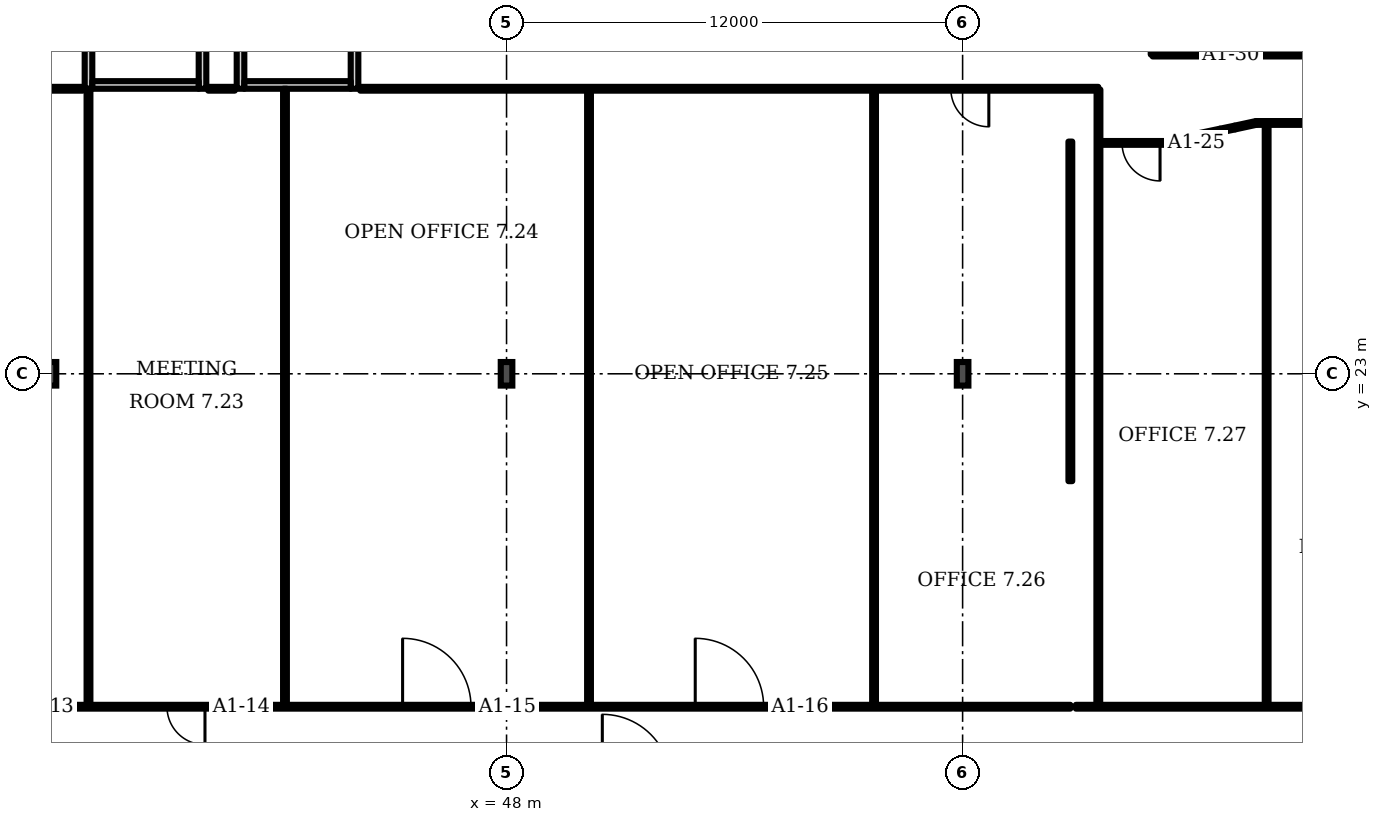
"""IFC4 building model, lengths in metres.
Left out: names, types, materials, properties, quantities, classifications, styles, units other than length and angle.
Written with IfcOpenShell. Run it as: python <this file> out.ifc"""

import sys

from ifc_helpers import new_model, si_unit, direction, frame, frame_2d, origin, origin_2d, place, context, subcontext, project, spatial, rectangle, i_section, extrude, element, fill, save


model = new_model("IFC4")
c1 = context("Model", 3, precision=1e-05, world=origin(), true_north=direction((0.0, 1.0)))
c2 = subcontext(c1, "Body", "Model", "MODEL_VIEW")
j1 = project(units=[si_unit("LENGTHUNIT", "METRE"), si_unit("PLANEANGLEUNIT", "RADIAN")], contexts=[c1])
p1 = place(None, origin())
s1 = spatial("IfcSite", under=j1, at=p1, CompositionType="ELEMENT")
p2 = place(p1, origin())
s2 = spatial("IfcBuilding", under=s1, at=p2, CompositionType="ELEMENT")
p3 = place(p2, frame((0.0, 0.0, 45.1)))
s3 = spatial("IfcBuildingStorey", under=s2, at=p3, CompositionType="ELEMENT", Elevation=45.1)
for number, where, z_axis, x_axis in (
    (1, (36.0, 23.0, 0.0), (0.0, 0.0, 1.0), (1.0, 0.0, 0.0)),
    (2, (48.0, 23.0, 0.0), (0.0, 0.0, 1.0), (1.0, 0.0, 0.0)),
    (3, (60.0, 23.0, 0.0), (0.0, 0.0, 1.0), (1.0, 0.0, 0.0)),
):
    element("IfcColumn", number, at=place(p3, frame(where, z_axis=z_axis, x_axis=x_axis)), inside=s3, PredefinedType="COLUMN", context=c2, shape_type="SweptSolid", body=[
        extrude(i_section(OverallWidth=0.305, OverallDepth=0.62, WebThickness=0.021, FlangeThickness=0.04, FilletRadius=0.027, at=origin_2d()), origin(), (0.0, 0.0, 1.0), 3.6),
    ])
p4 = place(p3, frame((37.0, 30.5, 0.0), z_axis=(0.0, 0.0, 1.0), x_axis=(0.0, 1.0, 0.0)))
e4 = element("IfcWall", 4, at=p4, inside=s3, PredefinedType="PARTITIONING", context=c2, shape_type="SweptSolid", body=[
    extrude(rectangle(XDim=3.5, YDim=0.2, at=frame_2d((1.75, 0.0))), origin(), (0.0, 0.0, 1.0), 3.2),
])
p5 = place(p4, frame((1.2, 0.0, 0.0)))
e5 = element("IfcOpeningElement", 5, at=p5, cuts=e4, PredefinedType="OPENING", context=c2, shape_type="SweptSolid", body=[
    extrude(rectangle(XDim=1.1, YDim=2.1, at=frame_2d((0.55, 1.05))), frame((0.0, 0.11, 0.0), z_axis=(0.0, -1.0, 0.0), x_axis=(1.0, 0.0, 0.0)), (0.0, 0.0, 1.0), 0.22),
])
p6 = place(p3, frame((40.0, 30.5, 0.0), z_axis=(0.0, 0.0, 1.0), x_axis=(0.0, 1.0, 0.0)))
e6 = element("IfcWall", 6, at=p6, inside=s3, PredefinedType="PARTITIONING", context=c2, shape_type="SweptSolid", body=[
    extrude(rectangle(XDim=3.5, YDim=0.2, at=frame_2d((1.75, 0.0))), origin(), (0.0, 0.0, 1.0), 3.2),
])
p7 = place(p3, frame((37.1, 30.6, 0.0), z_axis=(0.0, 0.0, 1.0), x_axis=(1.0, 0.0, 0.0)))
e7 = element("IfcWall", 7, at=p7, inside=s3, PredefinedType="PARTITIONING", context=c2, shape_type="SweptSolid", body=[
    extrude(rectangle(XDim=2.8, YDim=0.2, at=frame_2d((1.4, 0.0))), origin(), (0.0, 0.0, 1.0), 3.2),
])
p8 = place(p3, frame((41.0, 30.5, 0.0), z_axis=(0.0, 0.0, 1.0), x_axis=(0.0, 1.0, 0.0)))
e8 = element("IfcWall", 8, at=p8, inside=s3, PredefinedType="PARTITIONING", context=c2, shape_type="SweptSolid", body=[
    extrude(rectangle(XDim=3.5, YDim=0.2, at=frame_2d((1.75, 0.0))), origin(), (0.0, 0.0, 1.0), 3.2),
])
p9 = place(p3, frame((44.0, 30.5, 0.0), z_axis=(0.0, 0.0, 1.0), x_axis=(0.0, 1.0, 0.0)))
e9 = element("IfcWall", 9, at=p9, inside=s3, PredefinedType="PARTITIONING", context=c2, shape_type="SweptSolid", body=[
    extrude(rectangle(XDim=3.5, YDim=0.2, at=frame_2d((1.75, 0.0))), origin(), (0.0, 0.0, 1.0), 3.2),
])
p10 = place(p9, frame((1.2, 0.0, 0.0)))
e10 = element("IfcOpeningElement", 10, at=p10, cuts=e9, PredefinedType="OPENING", context=c2, shape_type="SweptSolid", body=[
    extrude(rectangle(XDim=1.1, YDim=2.1, at=frame_2d((0.55, 1.05))), frame((0.0, 0.11, 0.0), z_axis=(0.0, -1.0, 0.0), x_axis=(1.0, 0.0, 0.0)), (0.0, 0.0, 1.0), 0.22),
])
p11 = place(p3, frame((41.1, 30.6, 0.0), z_axis=(0.0, 0.0, 1.0), x_axis=(1.0, 0.0, 0.0)))
e11 = element("IfcWall", 11, at=p11, inside=s3, PredefinedType="PARTITIONING", context=c2, shape_type="SweptSolid", body=[
    extrude(rectangle(XDim=2.8, YDim=0.2, at=frame_2d((1.4, 0.0))), origin(), (0.0, 0.0, 1.0), 3.2),
])
p12 = place(p3, frame((10.8, 30.5, 0.0), z_axis=(0.0, 0.0, 1.0), x_axis=(1.0, 0.0, 0.0)))
e12 = element("IfcWall", 12, at=p12, inside=s3, PredefinedType="PARTITIONING", context=c2, shape_type="SweptSolid", body=[
    extrude(rectangle(XDim=26.05, YDim=0.1, at=frame_2d((13.025, 0.0))), origin(), (0.0, 0.0, 1.0), 3.2),
])
p13 = place(p12, frame((0.235, 0.0, 0.0)))
e13 = element("IfcOpeningElement", 13, at=p13, cuts=e12, PredefinedType="OPENING", context=c2, shape_type="SweptSolid", body=[
    extrude(rectangle(XDim=1.0, YDim=2.1, at=frame_2d((0.5, 1.05))), frame((0.0, 0.06, 0.0), z_axis=(0.0, -1.0, 0.0), x_axis=(1.0, 0.0, 0.0)), (0.0, 0.0, 1.0), 0.12),
])
p14 = place(p12, frame((10.955, 0.0, 0.0)))
e14 = element("IfcOpeningElement", 14, at=p14, cuts=e12, PredefinedType="OPENING", context=c2, shape_type="SweptSolid", body=[
    extrude(rectangle(XDim=1.0, YDim=2.1, at=frame_2d((0.5, 1.05))), frame((0.0, 0.06, 0.0), z_axis=(0.0, -1.0, 0.0), x_axis=(1.0, 0.0, 0.0)), (0.0, 0.0, 1.0), 0.12),
])
p15 = place(p3, frame((11.2, 14.24, 0.0), z_axis=(0.0, 0.0, 1.0), x_axis=(1.0, 0.0, 0.0)))
e15 = element("IfcWall", 15, at=p15, inside=s3, PredefinedType="PARTITIONING", context=c2, shape_type="SweptSolid", body=[
    extrude(rectangle(XDim=51.635, YDim=0.1, at=frame_2d((25.817, 0.0))), origin(), (0.0, 0.0, 1.0), 3.2),
])
p16 = place(p15, frame((0.115, 0.0, 0.0)))
e16 = element("IfcOpeningElement", 16, at=p16, cuts=e15, PredefinedType="OPENING", context=c2, shape_type="SweptSolid", body=[
    extrude(rectangle(XDim=1.0, YDim=2.1, at=frame_2d((0.5, 1.05))), frame((0.0, 0.06, 0.0), z_axis=(0.0, -1.0, 0.0), x_axis=(1.0, 0.0, 0.0)), (0.0, 0.0, 1.0), 0.12),
])
p17 = place(p15, frame((6.635, 0.0, 0.0)))
e17 = element("IfcOpeningElement", 17, at=p17, cuts=e15, PredefinedType="OPENING", context=c2, shape_type="SweptSolid", body=[
    extrude(rectangle(XDim=1.0, YDim=2.1, at=frame_2d((0.5, 1.05))), frame((0.0, 0.06, 0.0), z_axis=(0.0, -1.0, 0.0), x_axis=(1.0, 0.0, 0.0)), (0.0, 0.0, 1.0), 0.12),
])
p18 = place(p15, frame((22.7, 0.0, 0.0)))
e18 = element("IfcOpeningElement", 18, at=p18, cuts=e15, PredefinedType="OPENING", context=c2, shape_type="SweptSolid", body=[
    extrude(rectangle(XDim=1.0, YDim=2.1, at=frame_2d((0.5, 1.05))), frame((0.0, 0.06, 0.0), z_axis=(0.0, -1.0, 0.0), x_axis=(1.0, 0.0, 0.0)), (0.0, 0.0, 1.0), 0.12),
])
p19 = place(p15, frame((27.865, 0.0, 0.0)))
e19 = element("IfcOpeningElement", 19, at=p19, cuts=e15, PredefinedType="OPENING", context=c2, shape_type="SweptSolid", body=[
    extrude(rectangle(XDim=1.0, YDim=2.1, at=frame_2d((0.5, 1.05))), frame((0.0, 0.06, 0.0), z_axis=(0.0, -1.0, 0.0), x_axis=(1.0, 0.0, 0.0)), (0.0, 0.0, 1.0), 0.12),
])
p20 = place(p15, frame((34.065, 0.0, 0.0)))
e20 = element("IfcOpeningElement", 20, at=p20, cuts=e15, PredefinedType="OPENING", context=c2, shape_type="SweptSolid", body=[
    extrude(rectangle(XDim=1.8, YDim=2.1, at=frame_2d((0.9, 1.05))), frame((0.0, 0.06, 0.0), z_axis=(0.0, -1.0, 0.0), x_axis=(1.0, 0.0, 0.0)), (0.0, 0.0, 1.0), 0.12),
])
p21 = place(p15, frame((41.765, 0.0, 0.0)))
e21 = element("IfcOpeningElement", 21, at=p21, cuts=e15, PredefinedType="OPENING", context=c2, shape_type="SweptSolid", body=[
    extrude(rectangle(XDim=1.8, YDim=2.1, at=frame_2d((0.9, 1.05))), frame((0.0, 0.06, 0.0), z_axis=(0.0, -1.0, 0.0), x_axis=(1.0, 0.0, 0.0)), (0.0, 0.0, 1.0), 0.12),
])
for number, where, z_axis, x_axis in (
    (22, (37.0, 14.24, 0.0), (0.0, 0.0, 1.0), (0.0, 1.0, 0.0)),
    (23, (42.17, 14.24, 0.0), (0.0, 0.0, 1.0), (0.0, 1.0, 0.0)),
    (24, (50.17, 14.24, 0.0), (0.0, 0.0, 1.0), (0.0, 1.0, 0.0)),
    (25, (57.67, 14.24, 0.0), (0.0, 0.0, 1.0), (0.0, 1.0, 0.0)),
):
    element("IfcWall", number, at=place(p3, frame(where, z_axis=z_axis, x_axis=x_axis)), inside=s3, PredefinedType="PARTITIONING", context=c2, shape_type="SweptSolid", body=[
        extrude(rectangle(XDim=16.26, YDim=0.1, at=frame_2d((8.13, 0.0))), origin(), (0.0, 0.0, 1.0), 3.2),
    ])
p22 = place(p3, frame((62.835, 20.175, 0.0), z_axis=(0.0, 0.0, 1.0), x_axis=(0.0, 1.0, 0.0)))
e26 = element("IfcWall", 26, at=p22, inside=s3, PredefinedType="PARTITIONING", context=c2, shape_type="SweptSolid", body=[
    extrude(rectangle(XDim=8.935, YDim=0.1, at=frame_2d((4.468, 0.0))), origin(), (0.0, 0.0, 1.0), 3.2),
])
p23 = place(p3, frame((62.98, 14.24, 0.0), z_axis=(0.0, 0.0, 1.0), x_axis=(1.0, 0.0, 0.0)))
e27 = element("IfcWall", 27, at=p23, inside=s3, PredefinedType="PARTITIONING", context=c2, shape_type="SweptSolid", body=[
    extrude(rectangle(XDim=23.01, YDim=0.1, at=frame_2d((11.505, 0.0))), origin(), (0.0, 0.0, 1.0), 3.2),
])
p24 = place(p23, frame((8.6, 0.0, 0.0)))
e28 = element("IfcOpeningElement", 28, at=p24, cuts=e27, PredefinedType="OPENING", context=c2, shape_type="SweptSolid", body=[
    extrude(rectangle(XDim=1.0, YDim=2.1, at=frame_2d((0.5, 1.05))), frame((0.0, 0.06, 0.0), z_axis=(0.0, -1.0, 0.0), x_axis=(1.0, 0.0, 0.0)), (0.0, 0.0, 1.0), 0.12),
])
p25 = place(p23, frame((17.595, 0.0, 0.0)))
e29 = element("IfcOpeningElement", 29, at=p25, cuts=e27, PredefinedType="OPENING", context=c2, shape_type="SweptSolid", body=[
    extrude(rectangle(XDim=1.0, YDim=2.1, at=frame_2d((0.5, 1.05))), frame((0.0, 0.06, 0.0), z_axis=(0.0, -1.0, 0.0), x_axis=(1.0, 0.0, 0.0)), (0.0, 0.0, 1.0), 0.12),
])
p26 = place(p3, frame((63.57, 14.245, 0.0), z_axis=(0.0, 0.0, 1.0), x_axis=(0.000331, 1.000002, 0.0)))
e30 = element("IfcWall", 30, at=p26, inside=s3, PredefinedType="PARTITIONING", context=c2, shape_type="SweptSolid", body=[
    extrude(rectangle(XDim=16.233, YDim=0.1, at=frame_2d((8.117, 0.0))), origin(), (0.0, 0.0, 1.0), 3.2),
])
p27 = place(p3, frame((63.575, 29.075, 0.0), z_axis=(0.0, 0.0, 1.0), x_axis=(1.0, 0.0, 0.0)))
e31 = element("IfcWall", 31, at=p27, inside=s3, PredefinedType="PARTITIONING", context=c2, shape_type="SweptSolid", body=[
    extrude(rectangle(XDim=2.08, YDim=0.1, at=frame_2d((1.04, 0.0))), origin(), (0.0, 0.0, 1.0), 3.2),
])
p28 = place(p27, frame((0.62, 0.0, 0.0)))
e32 = element("IfcOpeningElement", 32, at=p28, cuts=e31, PredefinedType="OPENING", context=c2, shape_type="SweptSolid", body=[
    extrude(rectangle(XDim=1.0, YDim=2.1, at=frame_2d((0.5, 1.05))), frame((0.0, 0.06, 0.0), z_axis=(0.0, -1.0, 0.0), x_axis=(1.0, 0.0, 0.0)), (0.0, 0.0, 1.0), 0.12),
])
p29 = place(p3, frame((65.0, 31.4, 0.0), z_axis=(0.0, 0.0, 1.0), x_axis=(0.0, 1.0, 0.0)))
e33 = element("IfcWall", 33, at=p29, inside=s3, PredefinedType="PARTITIONING", context=c2, shape_type="SweptSolid", body=[
    extrude(rectangle(XDim=2.58, YDim=0.1, at=frame_2d((1.29, 0.0))), origin(), (0.0, 0.0, 1.0), 3.2),
])
p30 = place(p3, frame((65.0, 31.4, 0.0), z_axis=(0.0, 0.0, 1.0), x_axis=(1.0, 0.0, 0.0)))
e34 = element("IfcWall", 34, at=p30, inside=s3, PredefinedType="PARTITIONING", context=c2, shape_type="SweptSolid", body=[
    extrude(rectangle(XDim=7.125, YDim=0.1, at=frame_2d((3.562, 0.0))), origin(), (0.0, 0.0, 1.0), 3.2),
])
p31 = place(p30, frame((0.1, 0.0, 0.0)))
e35 = element("IfcOpeningElement", 35, at=p31, cuts=e34, PredefinedType="OPENING", context=c2, shape_type="SweptSolid", body=[
    extrude(rectangle(XDim=1.0, YDim=2.1, at=frame_2d((0.5, 1.05))), frame((0.0, 0.06, 0.0), z_axis=(0.0, -1.0, 0.0), x_axis=(1.0, 0.0, 0.0)), (0.0, 0.0, 1.0), 0.12),
])
p32 = place(p30, frame((5.625, 0.0, 0.0)))
e36 = element("IfcOpeningElement", 36, at=p32, cuts=e34, PredefinedType="OPENING", context=c2, shape_type="SweptSolid", body=[
    extrude(rectangle(XDim=1.0, YDim=2.1, at=frame_2d((0.5, 1.05))), frame((0.0, 0.06, 0.0), z_axis=(0.0, -1.0, 0.0), x_axis=(1.0, 0.0, 0.0)), (0.0, 0.0, 1.0), 0.12),
])
p33 = place(p3, frame((65.655, 29.075, 0.0), z_axis=(0.0, 0.0, 1.0), x_axis=(0.671773, 0.740757, 0.0)))
e37 = element("IfcWall", 37, at=p33, inside=s3, PredefinedType="PARTITIONING", context=c2, shape_type="SweptSolid", body=[
    extrude(rectangle(XDim=0.149, YDim=0.1, at=frame_2d((0.074, 0.0))), origin(), (0.0, 0.0, 1.0), 3.2),
])
p34 = place(p3, frame((65.755, 29.185, 0.0), z_axis=(0.0, 0.0, 1.0), x_axis=(0.978739, 0.205118, 0.0)))
e38 = element("IfcWall", 38, at=p34, inside=s3, PredefinedType="PARTITIONING", context=c2, shape_type="SweptSolid", body=[
    extrude(rectangle(XDim=1.047, YDim=0.1, at=frame_2d((0.524, 0.0))), origin(), (0.0, 0.0, 1.0), 3.2),
])
p35 = place(p3, frame((66.78, 29.4, 0.0), z_axis=(0.0, 0.0, 1.0), x_axis=(0.979048, 0.203632, 0.0)))
e39 = element("IfcWall", 39, at=p35, inside=s3, PredefinedType="PARTITIONING", context=c2, shape_type="SweptSolid", body=[
    extrude(rectangle(XDim=0.393, YDim=0.1, at=frame_2d((0.197, 0.0))), origin(), (0.0, 0.0, 1.0), 3.2),
])
p36 = place(p3, frame((67.165, 29.48, 0.0), z_axis=(0.0, 0.0, 1.0), x_axis=(0.977367, 0.211555, 0.0)))
e40 = element("IfcWall", 40, at=p36, inside=s3, PredefinedType="PARTITIONING", context=c2, shape_type="SweptSolid", body=[
    extrude(rectangle(XDim=0.568, YDim=0.1, at=frame_2d((0.284, 0.0))), origin(), (0.0, 0.0, 1.0), 3.2),
])
p37 = place(p3, frame((67.72, 29.6, 0.0), z_axis=(0.0, 0.0, 1.0), x_axis=(1.0, 0.0, 0.0)))
e41 = element("IfcWall", 41, at=p37, inside=s3, PredefinedType="PARTITIONING", context=c2, shape_type="SweptSolid", body=[
    extrude(rectangle(XDim=2.605, YDim=0.1, at=frame_2d((1.302, 0.0))), origin(), (0.0, 0.0, 1.0), 3.2),
])
p38 = place(p3, frame((68.0, 14.24, 0.0), z_axis=(0.0, 0.0, 1.0), x_axis=(0.0, 1.0, 0.0)))
e42 = element("IfcWall", 42, at=p38, inside=s3, PredefinedType="PARTITIONING", context=c2, shape_type="SweptSolid", body=[
    extrude(rectangle(XDim=15.36, YDim=0.1, at=frame_2d((7.68, 0.0))), origin(), (0.0, 0.0, 1.0), 3.2),
])
p39 = place(p3, frame((68.0, 31.4, 0.0), z_axis=(0.0, 0.0, 1.0), x_axis=(0.0, 1.0, 0.0)))
e43 = element("IfcWall", 43, at=p39, inside=s3, PredefinedType="PARTITIONING", context=c2, shape_type="SweptSolid", body=[
    extrude(rectangle(XDim=8.39, YDim=0.1, at=frame_2d((4.195, 0.0))), origin(), (0.0, 0.0, 1.0), 3.2),
])
p40 = place(p3, frame((40.15, 30.5, 0.0), z_axis=(0.0, 0.0, 1.0), x_axis=(1.0, 0.0, 0.0)))
e44 = element("IfcWall", 44, at=p40, inside=s3, PredefinedType="PARTITIONING", context=c2, shape_type="SweptSolid", body=[
    extrude(rectangle(XDim=0.7, YDim=0.1, at=frame_2d((0.35, 0.0))), origin(), (0.0, 0.0, 1.0), 3.2),
])
p41 = place(p3, frame((44.15, 30.5, 0.0), z_axis=(0.0, 0.0, 1.0), x_axis=(1.0, 0.0, 0.0)))
e45 = element("IfcWall", 45, at=p41, inside=s3, PredefinedType="PARTITIONING", context=c2, shape_type="SweptSolid", body=[
    extrude(rectangle(XDim=19.42, YDim=0.1, at=frame_2d((9.71, 0.0))), origin(), (0.0, 0.0, 1.0), 3.2),
])
p42 = place(p41, frame((15.54, 0.0, 0.0)))
e46 = element("IfcOpeningElement", 46, at=p42, cuts=e45, PredefinedType="OPENING", context=c2, shape_type="SweptSolid", body=[
    extrude(rectangle(XDim=1.0, YDim=2.1, at=frame_2d((0.5, 1.05))), frame((0.0, 0.06, 0.0), z_axis=(0.0, -1.0, 0.0), x_axis=(1.0, 0.0, 0.0)), (0.0, 0.0, 1.0), 0.12),
])
p43 = place(p19, origin())
e47 = element("IfcDoor", 47, at=p43, inside=s3, OperationType="SINGLE_SWING_RIGHT", PredefinedType="DOOR", context=c2, shape_type="SweptSolid", body=[
    extrude(rectangle(XDim=1.0, YDim=2.1, at=frame_2d((0.5, 1.05))), frame((0.0, 0.025, 0.0), z_axis=(0.0, -1.0, 0.0), x_axis=(1.0, 0.0, 0.0)), (0.0, 0.0, 1.0), 0.05),
])
fill(e19, e47)
p44 = place(p20, origin())
e48 = element("IfcDoor", 48, at=p44, inside=s3, OperationType="DOUBLE_DOOR_SINGLE_SWING", PredefinedType="DOOR", context=c2, shape_type="SweptSolid", body=[
    extrude(rectangle(XDim=1.8, YDim=2.1, at=frame_2d((0.9, 1.05))), frame((0.0, 0.025, 0.0), z_axis=(0.0, -1.0, 0.0), x_axis=(1.0, 0.0, 0.0)), (0.0, 0.0, 1.0), 0.05),
])
fill(e20, e48)
p45 = place(p21, origin())
e49 = element("IfcDoor", 49, at=p45, inside=s3, OperationType="DOUBLE_DOOR_SINGLE_SWING", PredefinedType="DOOR", context=c2, shape_type="SweptSolid", body=[
    extrude(rectangle(XDim=1.8, YDim=2.1, at=frame_2d((0.9, 1.05))), frame((0.0, 0.025, 0.0), z_axis=(0.0, -1.0, 0.0), x_axis=(1.0, 0.0, 0.0)), (0.0, 0.0, 1.0), 0.05),
])
fill(e21, e49)
p46 = place(p28, origin())
e50 = element("IfcDoor", 50, at=p46, inside=s3, OperationType="SINGLE_SWING_RIGHT", PredefinedType="DOOR", context=c2, shape_type="SweptSolid", body=[
    extrude(rectangle(XDim=1.0, YDim=2.1, at=frame_2d((0.5, 1.05))), frame((0.0, 0.025, 0.0), z_axis=(0.0, -1.0, 0.0), x_axis=(1.0, 0.0, 0.0)), (0.0, 0.0, 1.0), 0.05),
])
fill(e32, e50)
p47 = place(p42, origin())
e51 = element("IfcDoor", 51, at=p47, inside=s3, OperationType="SINGLE_SWING_RIGHT", PredefinedType="DOOR", context=c2, shape_type="SweptSolid", body=[
    extrude(rectangle(XDim=1.0, YDim=2.1, at=frame_2d((0.5, 1.05))), frame((0.0, 0.025, 0.0), z_axis=(0.0, -1.0, 0.0), x_axis=(1.0, 0.0, 0.0)), (0.0, 0.0, 1.0), 0.05),
])
fill(e46, e51)
p48 = place(p31, origin())
e52 = element("IfcDoor", 52, at=p48, inside=s3, OperationType="SINGLE_SWING_LEFT", PredefinedType="DOOR", context=c2, shape_type="SweptSolid", body=[
    extrude(rectangle(XDim=1.0, YDim=2.1, at=frame_2d((0.5, 1.05))), frame((0.0, 0.025, 0.0), z_axis=(0.0, -1.0, 0.0), x_axis=(1.0, 0.0, 0.0)), (0.0, 0.0, 1.0), 0.05),
])
fill(e35, e52)
save(model, sys.argv[1])
